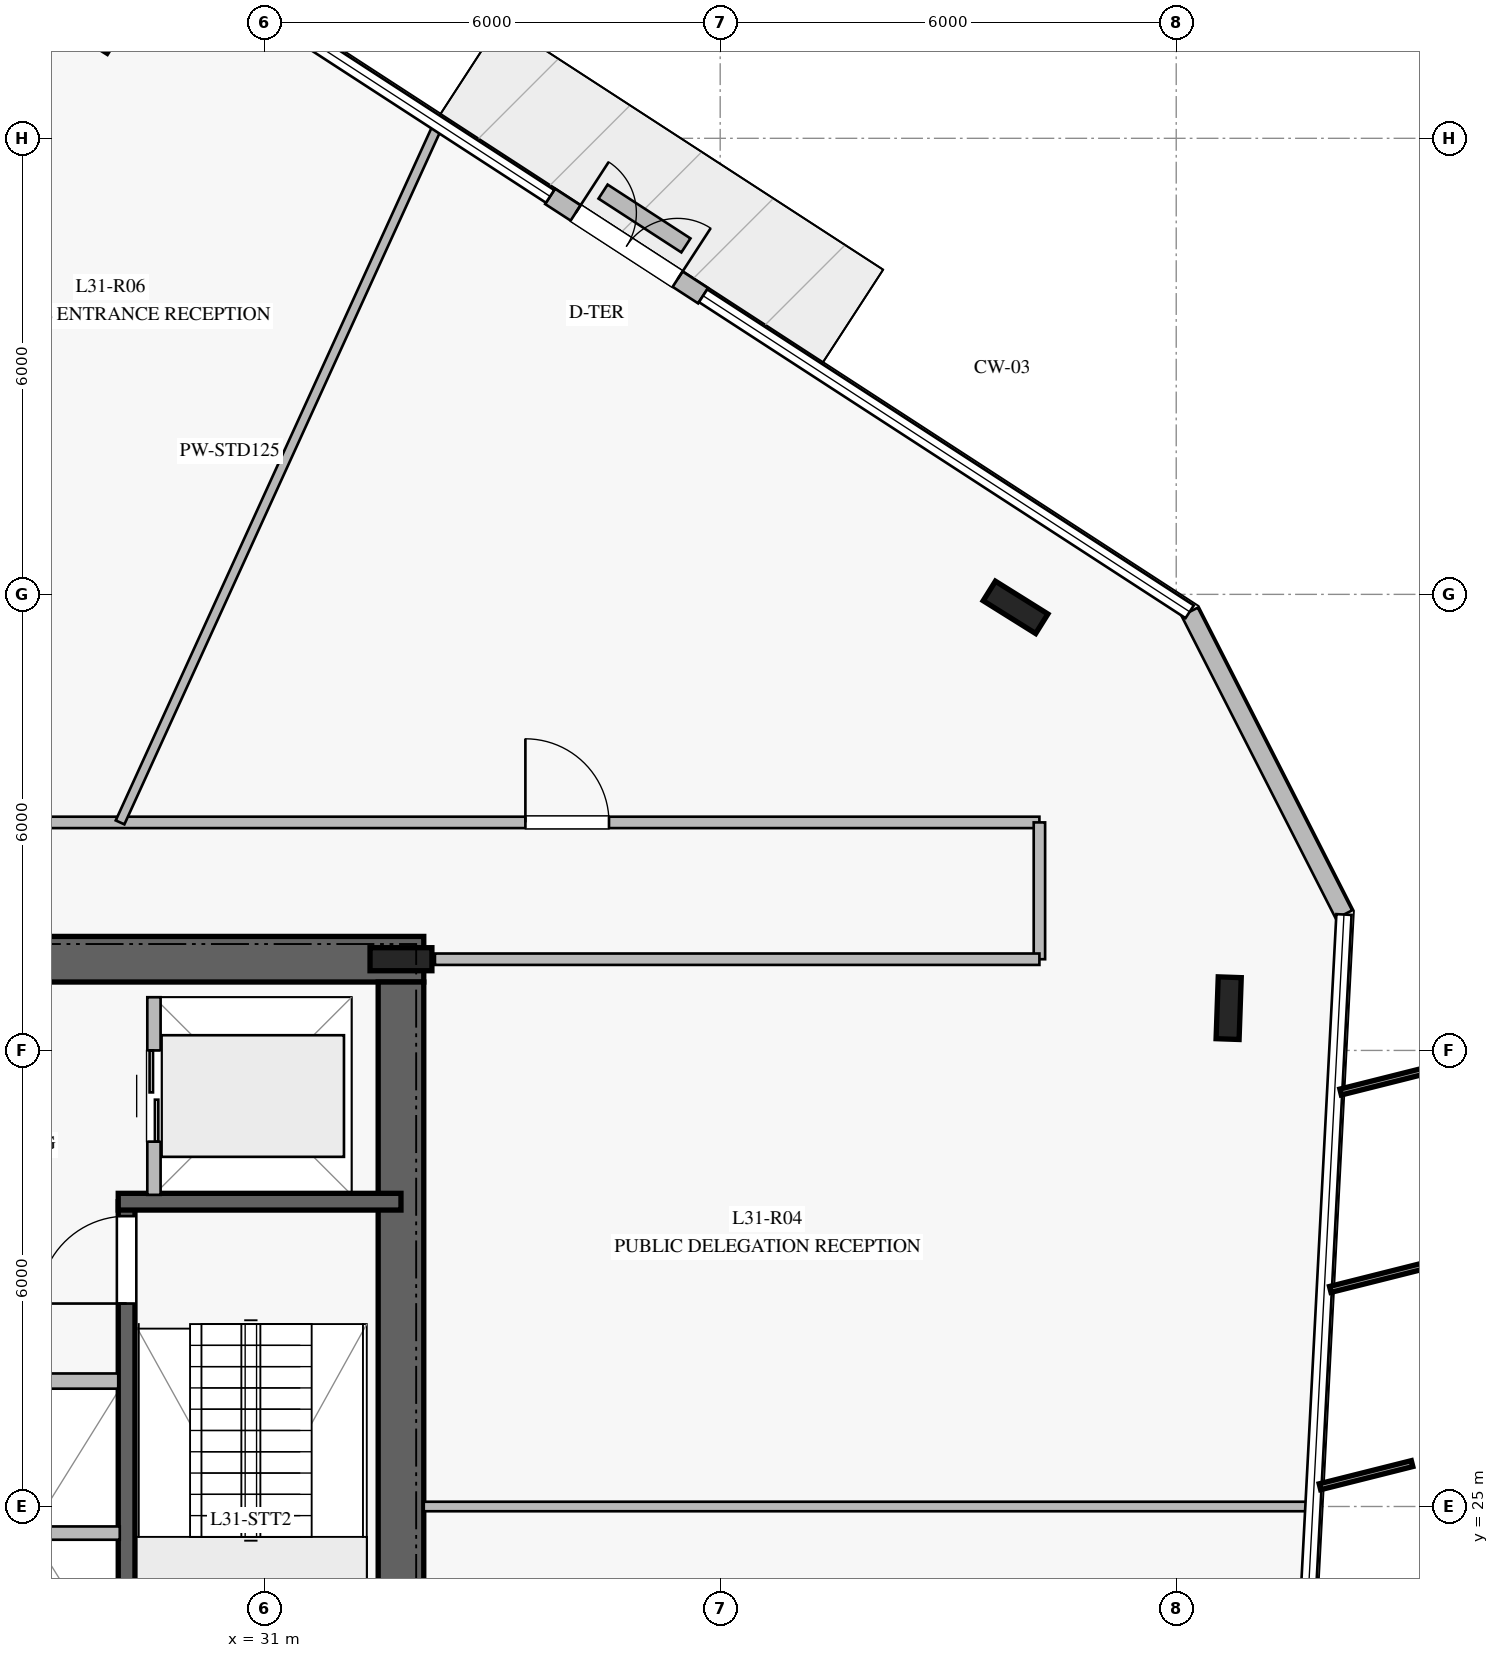
"""IFC4 building model, lengths in metres.
Left out: names, types, materials, properties, quantities, classifications, styles, units other than length and angle.
Written with IfcOpenShell. Run it as: python <this file> out.ifc"""

import sys

from ifc_helpers import new_model, si_unit, direction, frame, frame_2d, origin, origin_2d, place, context, subcontext, project, spatial, rectangle, i_section, extrude, element, fill, save


model = new_model("IFC4")
c1 = context("Model", 3, precision=1e-05, world=origin(), true_north=direction((0.0, 1.0)))
c2 = subcontext(c1, "Body", "Model", "MODEL_VIEW")
j1 = project(units=[si_unit("LENGTHUNIT", "METRE"), si_unit("PLANEANGLEUNIT", "RADIAN")], contexts=[c1])
p1 = place(None, origin())
s1 = spatial("IfcSite", under=j1, at=p1, CompositionType="ELEMENT")
p2 = place(p1, origin())
s2 = spatial("IfcBuilding", under=s1, at=p2, CompositionType="ELEMENT")
p3 = place(p2, frame((0.0, 0.0, 130.4)))
s3 = spatial("IfcBuildingStorey", under=s2, at=p3, CompositionType="ELEMENT", Elevation=130.4)
p4 = place(p3, frame((33.1, 32.2, 0.0), z_axis=(0.0, 0.0, 1.0), x_axis=(-1.0, 0.0, 0.0)))
e1 = element("IfcWall", 1, at=p4, inside=s3, PredefinedType="SHEAR", context=c2, shape_type="SweptSolid", body=[
    extrude(rectangle(XDim=16.2, YDim=0.6, at=frame_2d((8.1, 0.0))), origin(), (0.0, 0.0, 1.0), 3.76),
])
p5 = place(p4, frame((5.05, 0.0, 0.0)))
e2 = element("IfcOpeningElement", 2, at=p5, cuts=e1, PredefinedType="OPENING", context=c2, shape_type="SweptSolid", body=[
    extrude(rectangle(XDim=1.2, YDim=2.25, at=frame_2d((0.6, 1.125))), frame((0.0, 0.31, 0.0), z_axis=(0.0, -1.0, 0.0), x_axis=(1.0, 0.0, 0.0)), (0.0, 0.0, 1.0), 0.62),
])
p6 = place(p4, frame((11.85, 0.0, 0.0)))
e3 = element("IfcOpeningElement", 3, at=p6, cuts=e1, PredefinedType="OPENING", context=c2, shape_type="SweptSolid", body=[
    extrude(rectangle(XDim=1.1, YDim=2.2, at=frame_2d((0.55, 1.1))), frame((0.0, 0.31, 0.0), z_axis=(0.0, -1.0, 0.0), x_axis=(1.0, 0.0, 0.0)), (0.0, 0.0, 1.0), 0.62),
])
p7 = place(p4, frame((9.875, 0.0, 0.0)))
e4 = element("IfcOpeningElement", 4, at=p7, cuts=e1, PredefinedType="OPENING", context=c2, shape_type="SweptSolid", body=[
    extrude(rectangle(XDim=1.1, YDim=2.2, at=frame_2d((0.55, 1.1))), frame((0.0, 0.31, 0.0), z_axis=(0.0, -1.0, 0.0), x_axis=(1.0, 0.0, 0.0)), (0.0, 0.0, 1.0), 0.62),
])
p8 = place(p4, frame((7.9, 0.0, 0.0)))
e5 = element("IfcOpeningElement", 5, at=p8, cuts=e1, PredefinedType="OPENING", context=c2, shape_type="SweptSolid", body=[
    extrude(rectangle(XDim=1.1, YDim=2.2, at=frame_2d((0.55, 1.1))), frame((0.0, 0.31, 0.0), z_axis=(0.0, -1.0, 0.0), x_axis=(1.0, 0.0, 0.0)), (0.0, 0.0, 1.0), 0.62),
])
p9 = place(p3, frame((32.8, 18.1, 0.0), z_axis=(0.0, 0.0, 1.0), x_axis=(0.0, 1.0, 0.0)))
e6 = element("IfcWall", 6, at=p9, inside=s3, PredefinedType="SHEAR", context=c2, shape_type="SweptSolid", body=[
    extrude(rectangle(XDim=13.8, YDim=0.6, at=frame_2d((6.9, 0.0))), origin(), (0.0, 0.0, 1.0), 3.76),
])
p10 = place(p3, frame((32.8, 32.2, 0.0), z_axis=(0.0, 0.0, 1.0), x_axis=(1.0, 0.0, 0.0)))
e7 = element("IfcColumn", 7, at=p10, inside=s3, PredefinedType="COLUMN", context=c2, shape_type="SweptSolid", body=[
    extrude(i_section(OverallWidth=0.303, OverallDepth=0.814, WebThickness=0.021, FlangeThickness=0.04, at=origin_2d()), origin(), (0.0, 0.0, 1.0), 4.0),
])
p11 = place(p3, frame((29.19, 21.79, 0.0), z_axis=(0.0, 0.0, 1.0), x_axis=(0.0, 1.0, 0.0)))
e8 = element("IfcWall", 8, at=p11, inside=s3, PredefinedType="SOLIDWALL", context=c2, shape_type="SweptSolid", body=[
    extrude(rectangle(XDim=7.22, YDim=0.22, at=frame_2d((3.61, 0.0))), origin(), (0.0, 0.0, 1.0), 3.76),
])
p12 = place(p11, frame((5.88, 0.0, 0.0)))
e9 = element("IfcOpeningElement", 9, at=p12, cuts=e8, PredefinedType="OPENING", context=c2, shape_type="SweptSolid", body=[
    extrude(rectangle(XDim=1.15, YDim=2.2, at=frame_2d((0.575, 1.1))), frame((0.0, 0.12, 0.0), z_axis=(0.0, -1.0, 0.0), x_axis=(1.0, 0.0, 0.0)), (0.0, 0.0, 1.0), 0.24),
])
p13 = place(p3, frame((29.08, 29.01, 0.0), z_axis=(0.0, 0.0, 1.0), x_axis=(1.0, 0.0, 0.0)))
e10 = element("IfcWall", 10, at=p13, inside=s3, PredefinedType="SOLIDWALL", context=c2, shape_type="SweptSolid", body=[
    extrude(rectangle(XDim=3.72, YDim=0.22, at=frame_2d((1.86, 0.0))), origin(), (0.0, 0.0, 1.0), 3.76),
])
for number, where, z_axis, x_axis in (
    (11, (40.886, 36.829, 0.0), (0.0, 0.0, 1.0), (-0.848, 0.53, 0.0)),
    (12, (28.668, 44.464, 0.0), (0.0, 0.0, 1.0), (-0.848, 0.53, 0.0)),
    (13, (43.69, 31.556, 0.0), (0.0, 0.0, 1.0), (0.035, 0.999, 0.0)),
):
    element("IfcColumn", number, at=place(p3, frame(where, z_axis=z_axis, x_axis=x_axis)), inside=s3, PredefinedType="COLUMN", context=c2, shape_type="SweptSolid", body=[
        extrude(i_section(OverallWidth=0.303, OverallDepth=0.814, WebThickness=0.021, FlangeThickness=0.04, at=origin_2d()), origin(), (0.0, 0.0, 1.0), 4.0),
    ])
p14 = place(p3, frame((36.775, 40.929, 0.0), z_axis=(0.0, 0.0, 1.0), x_axis=(-0.838687554781, 0.544612876689, 0.0)))
e14 = element("IfcWall", 14, at=p14, inside=s3, PredefinedType="STANDARD", context=c2, shape_type="SweptSolid", body=[
    extrude(rectangle(XDim=2.4, YDim=0.24, at=frame_2d((1.2, 0.0))), origin(), (0.0, 0.0, 1.0), 3.76),
])
p15 = place(p14, frame((0.4, 0.0, 0.0)))
e15 = element("IfcOpeningElement", 15, at=p15, cuts=e14, PredefinedType="OPENING", context=c2, shape_type="SweptSolid", body=[
    extrude(rectangle(XDim=1.6, YDim=2.25, at=frame_2d((0.8, 1.125))), frame((0.0, 0.13, 0.0), z_axis=(0.0, -1.0, 0.0), x_axis=(1.0, 0.0, 0.0)), (0.0, 0.0, 1.0), 0.26),
])
p16 = place(p3, frame((45.207, 32.788, 0.0), z_axis=(0.0, 0.0, 1.0), x_axis=(-0.454103301767, 0.89094903969, 0.0)))
e16 = element("IfcWall", 16, at=p16, inside=s3, PredefinedType="STANDARD", context=c2, shape_type="SweptSolid", body=[
    extrude(rectangle(XDim=4.47, YDim=0.24, at=frame_2d((2.235, 0.0))), origin(), (0.0, 0.0, 1.0), 3.76),
])
p17 = place(p3, frame((36.549, 41.591, 0.0), z_axis=(0.0, 0.0, 1.0), x_axis=(-0.838636669764, 0.544691230082, 0.0)))
e17 = element("IfcWall", 17, at=p17, inside=s3, PredefinedType="USERDEFINED", context=c2, shape_type="SweptSolid", body=[
    extrude(rectangle(XDim=1.3, YDim=0.22, at=frame_2d((0.65, 0.0))), origin(), (0.0, 0.0, 1.0), 0.4),
])
p18 = place(p3, frame((25.7, 26.65, 0.0), z_axis=(0.0, 0.0, 1.0), x_axis=(1.0, 0.0, 0.0)))
e18 = element("IfcWall", 18, at=p18, inside=s3, PredefinedType="PARTITIONING", context=c2, shape_type="SweptSolid", body=[
    extrude(rectangle(XDim=3.38, YDim=0.2, at=frame_2d((1.69, 0.0))), origin(), (0.0, 0.0, 1.0), 3.76),
])
p19 = place(p3, frame((26.75, 24.65, 0.0), z_axis=(0.0, 0.0, 1.0), x_axis=(1.0, 0.0, 0.0)))
e19 = element("IfcWall", 19, at=p19, inside=s3, PredefinedType="PARTITIONING", context=c2, shape_type="SweptSolid", body=[
    extrude(rectangle(XDim=2.35, YDim=0.175, at=frame_2d((1.175, 0.0))), origin(), (0.0, 0.0, 1.0), 3.76),
])
p20 = place(p3, frame((29.55, 29.1, 0.0), z_axis=(0.0, 0.0, 1.0), x_axis=(0.0, 1.0, 0.0)))
e20 = element("IfcWall", 20, at=p20, inside=s3, PredefinedType="PARTITIONING", context=c2, shape_type="SweptSolid", body=[
    extrude(rectangle(XDim=2.6, YDim=0.175, at=frame_2d((1.3, 0.0))), origin(), (0.0, 0.0, 1.0), 3.76),
])
p21 = place(p20, frame((0.7, 0.0, 0.0)))
e21 = element("IfcOpeningElement", 21, at=p21, cuts=e20, PredefinedType="OPENING", context=c2, shape_type="SweptSolid", body=[
    extrude(rectangle(XDim=1.2, YDim=2.2, at=frame_2d((0.6, 1.1))), frame((0.0, 0.098, 0.0), z_axis=(0.0, -1.0, 0.0), x_axis=(1.0, 0.0, 0.0)), (0.0, 0.0, 1.0), 0.195),
])
p22 = place(p3, frame((25.95, 34.0, 0.0), z_axis=(0.0, 0.0, 1.0), x_axis=(1.0, 0.0, 0.0)))
e22 = element("IfcWall", 22, at=p22, inside=s3, PredefinedType="PARTITIONING", context=c2, shape_type="SweptSolid", body=[
    extrude(rectangle(XDim=15.25, YDim=0.15, at=frame_2d((7.625, 0.0))), origin(), (0.0, 0.0, 1.0), 3.21),
])
p23 = place(p22, frame((8.487, 0.0, 0.0)))
e23 = element("IfcOpeningElement", 23, at=p23, cuts=e22, PredefinedType="OPENING", context=c2, shape_type="SweptSolid", body=[
    extrude(rectangle(XDim=1.1, YDim=2.2, at=frame_2d((0.55, 1.1))), frame((0.0, 0.085, 0.0), z_axis=(0.0, -1.0, 0.0), x_axis=(1.0, 0.0, 0.0)), (0.0, 0.0, 1.0), 0.17),
])
p24 = place(p3, frame((41.2, 34.0, 0.0), z_axis=(0.0, 0.0, 1.0), x_axis=(0.0, -1.0, 0.0)))
e24 = element("IfcWall", 24, at=p24, inside=s3, PredefinedType="PARTITIONING", context=c2, shape_type="SweptSolid", body=[
    extrude(rectangle(XDim=1.8, YDim=0.15, at=frame_2d((0.9, 0.0))), origin(), (0.0, 0.0, 1.0), 3.76),
])
p25 = place(p3, frame((41.2, 32.2, 0.0), z_axis=(0.0, 0.0, 1.0), x_axis=(-1.0, 0.0, 0.0)))
e25 = element("IfcWall", 25, at=p25, inside=s3, PredefinedType="PARTITIONING", context=c2, shape_type="SweptSolid", body=[
    extrude(rectangle(XDim=7.953, YDim=0.15, at=frame_2d((3.977, 0.0))), origin(), (0.0, 0.0, 1.0), 3.21),
])
p26 = place(p3, frame((29.104, 34.0, 0.0), z_axis=(0.0, 0.0, 1.0), x_axis=(0.414877179532, 0.90987742356, 0.0)))
e26 = element("IfcWall", 26, at=p26, inside=s3, PredefinedType="PARTITIONING", context=c2, shape_type="SweptSolid", body=[
    extrude(rectangle(XDim=10.083, YDim=0.125, at=frame_2d((5.042, 0.0))), origin(), (0.0, 0.0, 1.0), 3.05),
])
p27 = place(p3, frame((33.1, 25.0, 0.0), z_axis=(0.0, 0.0, 1.0), x_axis=(1.0, 0.0, 0.0)))
e27 = element("IfcWall", 27, at=p27, inside=s3, PredefinedType="PARTITIONING", context=c2, shape_type="SweptSolid", body=[
    extrude(rectangle(XDim=11.682, YDim=0.125, at=frame_2d((5.841, 0.0))), origin(), (0.0, 0.0, 1.0), 3.16),
])
p28 = place(p15, frame((1.6, 0.0, 0.0), z_axis=(0.0, 0.0, 1.0), x_axis=(-1.0, 0.0, 0.0)))
e28 = element("IfcDoor", 28, at=p28, inside=s3, OperationType="DOUBLE_DOOR_SINGLE_SWING", PredefinedType="DOOR", context=c2, shape_type="SweptSolid", body=[
    extrude(rectangle(XDim=1.6, YDim=2.25, at=frame_2d((0.8, 1.125))), frame((0.0, 0.025, 0.0), z_axis=(0.0, -1.0, 0.0), x_axis=(1.0, 0.0, 0.0)), (0.0, 0.0, 1.0), 0.05),
])
fill(e15, e28)
p29 = place(p12, origin())
e29 = element("IfcDoor", 29, at=p29, inside=s3, OperationType="SINGLE_SWING_LEFT", PredefinedType="DOOR", context=c2, shape_type="SweptSolid", body=[
    extrude(rectangle(XDim=1.15, YDim=2.2, at=frame_2d((0.575, 1.1))), frame((0.0, 0.025, 0.0), z_axis=(0.0, -1.0, 0.0), x_axis=(1.0, 0.0, 0.0)), (0.0, 0.0, 1.0), 0.05),
])
fill(e9, e29)
p30 = place(p21, origin())
e30 = element("IfcDoor", 30, at=p30, inside=s3, OperationType="DOUBLE_DOOR_SLIDING", PredefinedType="DOOR", context=c2, shape_type="SweptSolid", body=[
    extrude(rectangle(XDim=1.2, YDim=2.2, at=frame_2d((0.6, 1.1))), frame((0.0, 0.025, 0.0), z_axis=(0.0, -1.0, 0.0), x_axis=(1.0, 0.0, 0.0)), (0.0, 0.0, 1.0), 0.05),
])
fill(e21, e30)
p31 = place(p23, origin())
e31 = element("IfcDoor", 31, at=p31, inside=s3, OperationType="SINGLE_SWING_LEFT", PredefinedType="DOOR", context=c2, shape_type="SweptSolid", body=[
    extrude(rectangle(XDim=1.1, YDim=2.2, at=frame_2d((0.55, 1.1))), frame((0.0, 0.025, 0.0), z_axis=(0.0, -1.0, 0.0), x_axis=(1.0, 0.0, 0.0)), (0.0, 0.0, 1.0), 0.05),
])
fill(e23, e31)
save(model, sys.argv[1])
